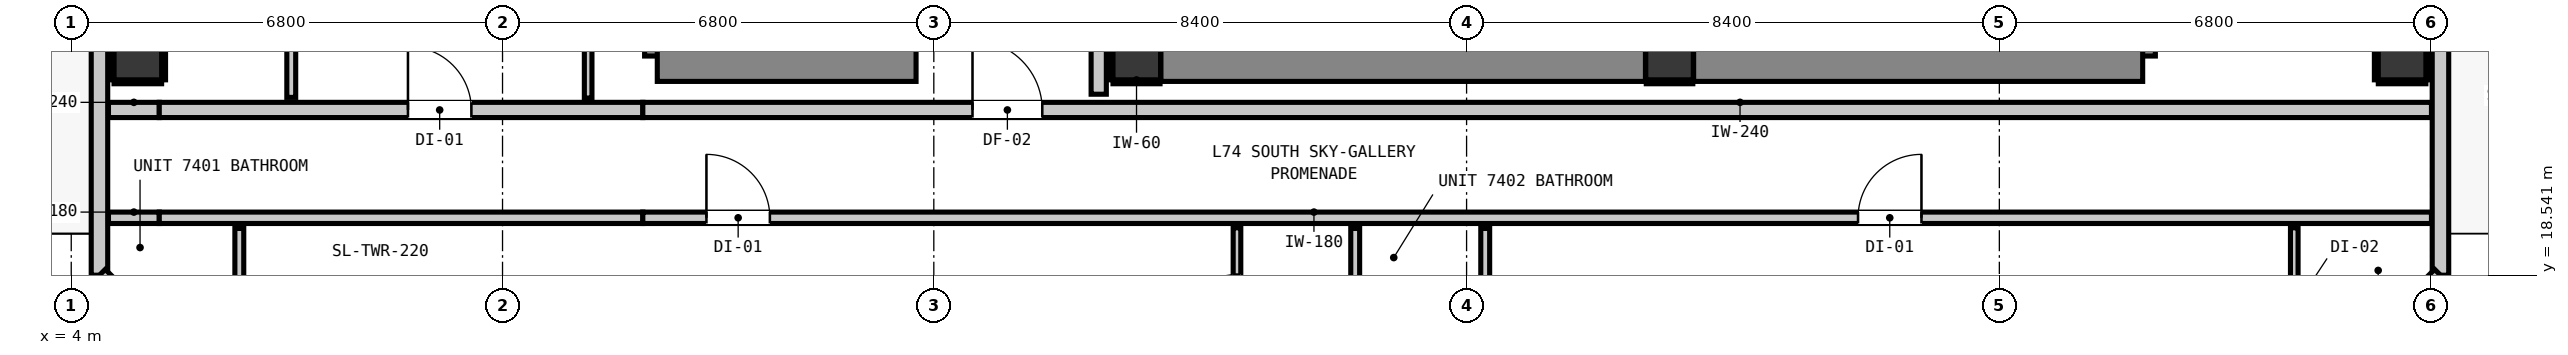
"""IFC4 building model, lengths in metres.
Left out: names, types, materials, properties, quantities, classifications, styles, units other than length and angle.
Written with IfcOpenShell. Run it as: python <this file> out.ifc"""

import sys

from ifc_helpers import new_model, si_unit, direction, frame, frame_2d, origin, origin_2d, place, context, subcontext, project, spatial, rectangle, extrude, element, fill, save


model = new_model("IFC4")
c1 = context("Model", 3, precision=1e-05, world=origin(), true_north=direction((0.0, 1.0)))
c2 = subcontext(c1, "Body", "Model", "MODEL_VIEW")
j1 = project(units=[si_unit("LENGTHUNIT", "METRE"), si_unit("PLANEANGLEUNIT", "RADIAN")], contexts=[c1])
p1 = place(None, origin())
s1 = spatial("IfcSite", under=j1, at=p1, CompositionType="ELEMENT")
p2 = place(p1, origin())
s2 = spatial("IfcBuilding", under=s1, at=p2, CompositionType="ELEMENT")
p3 = place(p2, frame((0.0, 0.0, 254.52)))
s3 = spatial("IfcBuildingStorey", under=s2, at=p3, CompositionType="ELEMENT", Elevation=254.52)
for number, where, z_axis, x_axis in (
    (1, (20.8, 22.0, 0.0), (0.0, 0.0, 1.0), (1.0, 0.0, 0.0)),
    (2, (29.2, 22.0, 0.0), (0.0, 0.0, 1.0), (1.0, 0.0, 0.0)),
):
    element("IfcColumn", number, at=place(p3, frame(where, z_axis=z_axis, x_axis=x_axis)), inside=s3, PredefinedType="COLUMN", context=c2, shape_type="SweptSolid", body=[
        extrude(rectangle(XDim=0.75, YDim=0.75, at=origin_2d()), origin(), (0.0, 0.0, 1.0), 3.32),
    ])
p4 = place(p3, frame((13.44, 22.0, 0.0), z_axis=(0.0, 0.0, 1.0), x_axis=(0.0, 1.0, 0.0)))
e3 = element("IfcWall", 3, at=p4, inside=s3, PredefinedType="SHEAR", context=c2, shape_type="SweptSolid", body=[
    extrude(rectangle(XDim=8.32, YDim=0.8, at=frame_2d((4.16, 0.0))), origin(), (0.0, 0.0, 1.0), 3.32),
])
p5 = place(p3, frame((13.24, 22.0, 0.0), z_axis=(0.0, 0.0, 1.0), x_axis=(1.0, 0.0, 0.0)))
e4 = element("IfcWall", 4, at=p5, inside=s3, PredefinedType="SHEAR", context=c2, shape_type="SweptSolid", body=[
    extrude(rectangle(XDim=4.08, YDim=0.8, at=frame_2d((2.04, 0.0))), origin(), (0.0, 0.0, 1.0), 3.32),
])
p6 = place(p3, frame((36.46, 22.0, 0.0), z_axis=(0.0, 0.0, 1.0), x_axis=(0.0, 1.0, 0.0)))
e5 = element("IfcWall", 5, at=p6, inside=s3, PredefinedType="SHEAR", context=c2, shape_type="SweptSolid", body=[
    extrude(rectangle(XDim=8.32, YDim=0.8, at=frame_2d((4.16, 0.0))), origin(), (0.0, 0.0, 1.0), 3.32),
])
p7 = place(p3, frame((29.58, 22.0, 0.0), z_axis=(0.0, 0.0, 1.0), x_axis=(1.0, 0.0, 0.0)))
e6 = element("IfcWall", 6, at=p7, inside=s3, PredefinedType="SHEAR", context=c2, shape_type="SweptSolid", body=[
    extrude(rectangle(XDim=7.08, YDim=0.8, at=frame_2d((3.54, 0.0))), origin(), (0.0, 0.0, 1.0), 3.32),
])
p8 = place(p3, frame((21.18, 22.0, 0.0), z_axis=(0.0, 0.0, 1.0), x_axis=(1.0, 0.0, 0.0)))
e7 = element("IfcWall", 7, at=p8, inside=s3, PredefinedType="SHEAR", context=c2, shape_type="SweptSolid", body=[
    extrude(rectangle(XDim=7.64, YDim=0.8, at=frame_2d((3.82, 0.0))), origin(), (0.0, 0.0, 1.0), 3.32),
])
for number, where, z_axis, x_axis in (
    (8, (5.05, 22.0, 0.0), (0.0, 0.0, 1.0), (1.0, 0.0, 0.0)),
    (9, (40.75, 22.0, 0.0), (0.0, 0.0, 1.0), (1.0, 0.0, 0.0)),
):
    element("IfcColumn", number, at=place(p3, frame(where, z_axis=z_axis, x_axis=x_axis)), inside=s3, PredefinedType="COLUMN", context=c2, shape_type="SweptSolid", body=[
        extrude(rectangle(XDim=0.75, YDim=0.75, at=origin_2d()), origin(), (0.0, 0.0, 1.0), 3.32),
    ])
p9 = place(p3, frame((4.445, 18.545, 0.0), z_axis=(0.0, 0.0, 1.0), x_axis=(0.0, 1.0, 0.0)))
e10 = element("IfcWall", 10, at=p9, inside=s3, PredefinedType="STANDARD", context=c2, shape_type="SweptSolid", body=[
    extrude(rectangle(XDim=30.31, YDim=0.26, at=frame_2d((15.155, 0.0))), origin(), (0.0, 0.0, 1.0), 2.96),
])
p10 = place(p9, frame((4.434, 0.0, 0.0)))
e11 = element("IfcOpeningElement", 11, at=p10, cuts=e10, PredefinedType="OPENING", context=c2, shape_type="SweptSolid", body=[
    extrude(rectangle(XDim=1.0, YDim=2.15, at=frame_2d((0.5, 1.075))), frame((0.0, 0.14, 0.0), z_axis=(0.0, -1.0, 0.0), x_axis=(1.0, 0.0, 0.0)), (0.0, 0.0, 1.0), 0.28),
])
p11 = place(p9, frame((27.715, 0.0, 0.85)))
e12 = element("IfcOpeningElement", 12, at=p11, cuts=e10, PredefinedType="OPENING", context=c2, shape_type="SweptSolid", body=[
    extrude(rectangle(XDim=2.1, YDim=1.9, at=frame_2d((1.05, 0.95))), frame((0.0, 0.14, 0.0), z_axis=(0.0, -1.0, 0.0), x_axis=(1.0, 0.0, 0.0)), (0.0, 0.0, 1.0), 0.28),
])
p12 = place(p3, frame((41.355, 48.855, 0.0), z_axis=(0.0, 0.0, 1.0), x_axis=(0.0, -1.0, 0.0)))
e13 = element("IfcWall", 13, at=p12, inside=s3, PredefinedType="STANDARD", context=c2, shape_type="SweptSolid", body=[
    extrude(rectangle(XDim=30.31, YDim=0.26, at=frame_2d((15.155, 0.0))), origin(), (0.0, 0.0, 1.0), 2.96),
])
p13 = place(p12, frame((0.91, 0.0, 0.0)))
e14 = element("IfcOpeningElement", 14, at=p13, cuts=e13, PredefinedType="OPENING", context=c2, shape_type="SweptSolid", body=[
    extrude(rectangle(XDim=1.0, YDim=2.15, at=frame_2d((0.5, 1.075))), frame((0.0, 0.14, 0.0), z_axis=(0.0, -1.0, 0.0), x_axis=(1.0, 0.0, 0.0)), (0.0, 0.0, 1.0), 0.28),
])
p14 = place(p12, frame((3.407, 0.0, 0.85)))
e15 = element("IfcOpeningElement", 15, at=p14, cuts=e13, PredefinedType="OPENING", context=c2, shape_type="SweptSolid", body=[
    extrude(rectangle(XDim=2.1, YDim=1.9, at=frame_2d((1.05, 0.95))), frame((0.0, 0.14, 0.0), z_axis=(0.0, -1.0, 0.0), x_axis=(1.0, 0.0, 0.0)), (0.0, 0.0, 1.0), 0.28),
])
for number, where, z_axis, x_axis in (
    (16, (41.355, 18.545, 0.0), (0.0, 0.0, 1.0), (-0.707, -0.707, 0.0)),
    (17, (6.545, 16.445, 0.0), (0.0, 0.0, 1.0), (-0.707, 0.707, 0.0)),
):
    element("IfcWall", number, at=place(p3, frame(where, z_axis=z_axis, x_axis=x_axis)), inside=s3, PredefinedType="STANDARD", context=c2, shape_type="SweptSolid", body=[
        extrude(rectangle(XDim=2.97, YDim=0.26, at=frame_2d((1.485, 0.0))), origin(), (0.0, 0.0, 1.0), 2.96),
    ])
p15 = place(p3, frame((4.587, 21.15, 0.0), z_axis=(0.0, 0.0, 1.0), x_axis=(1.0, 0.0, 0.0)))
e18 = element("IfcWall", 18, at=p15, inside=s3, PredefinedType="PARTITIONING", context=c2, shape_type="SweptSolid", body=[
    extrude(rectangle(XDim=0.801, YDim=0.24, at=frame_2d((0.4, 0.0))), origin(), (0.0, 0.0, 1.0), 2.96),
])
p16 = place(p3, frame((5.388, 21.15, 0.0), z_axis=(0.0, 0.0, 1.0), x_axis=(1.0, 0.0, 0.0)))
e19 = element("IfcWall", 19, at=p16, inside=s3, PredefinedType="PARTITIONING", context=c2, shape_type="SweptSolid", body=[
    extrude(rectangle(XDim=7.624, YDim=0.24, at=frame_2d((3.812, 0.0))), origin(), (0.0, 0.0, 1.0), 2.337),
])
p17 = place(p16, frame((3.921, 0.0, 0.0)))
e20 = element("IfcOpeningElement", 20, at=p17, cuts=e19, PredefinedType="OPENING", context=c2, shape_type="SweptSolid", body=[
    extrude(rectangle(XDim=1.0, YDim=2.15, at=frame_2d((0.5, 1.075))), frame((0.0, 0.13, 0.0), z_axis=(0.0, -1.0, 0.0), x_axis=(1.0, 0.0, 0.0)), (0.0, 0.0, 1.0), 0.26),
])
p18 = place(p3, frame((13.012, 21.15, 0.0), z_axis=(0.0, 0.0, 1.0), x_axis=(1.0, 0.0, 0.0)))
e21 = element("IfcWall", 21, at=p18, inside=s3, PredefinedType="PARTITIONING", context=c2, shape_type="SweptSolid", body=[
    extrude(rectangle(XDim=28.201, YDim=0.24, at=frame_2d((14.101, 0.0))), origin(), (0.0, 0.0, 1.0), 2.96),
])
p19 = place(p18, frame((5.198, 0.0, 0.0)))
e22 = element("IfcOpeningElement", 22, at=p19, cuts=e21, PredefinedType="OPENING", context=c2, shape_type="SweptSolid", body=[
    extrude(rectangle(XDim=1.1, YDim=2.15, at=frame_2d((0.55, 1.075))), frame((0.0, 0.13, 0.0), z_axis=(0.0, -1.0, 0.0), x_axis=(1.0, 0.0, 0.0)), (0.0, 0.0, 1.0), 0.26),
])
p20 = place(p3, frame((4.587, 19.45, 0.0), z_axis=(0.0, 0.0, 1.0), x_axis=(1.0, 0.0, 0.0)))
e23 = element("IfcWall", 23, at=p20, inside=s3, PredefinedType="PARTITIONING", context=c2, shape_type="SweptSolid", body=[
    extrude(rectangle(XDim=0.801, YDim=0.18, at=frame_2d((0.4, 0.0))), origin(), (0.0, 0.0, 1.0), 2.96),
])
p21 = place(p3, frame((5.388, 19.45, 0.0), z_axis=(0.0, 0.0, 1.0), x_axis=(1.0, 0.0, 0.0)))
e24 = element("IfcWall", 24, at=p21, inside=s3, PredefinedType="PARTITIONING", context=c2, shape_type="SweptSolid", body=[
    extrude(rectangle(XDim=7.624, YDim=0.18, at=frame_2d((3.812, 0.0))), origin(), (0.0, 0.0, 1.0), 2.337),
])
p22 = place(p3, frame((13.012, 19.45, 0.0), z_axis=(0.0, 0.0, 1.0), x_axis=(1.0, 0.0, 0.0)))
e25 = element("IfcWall", 25, at=p22, inside=s3, PredefinedType="PARTITIONING", context=c2, shape_type="SweptSolid", body=[
    extrude(rectangle(XDim=28.201, YDim=0.18, at=frame_2d((14.101, 0.0))), origin(), (0.0, 0.0, 1.0), 2.96),
])
p23 = place(p22, frame((1.003, 0.0, 0.0)))
e26 = element("IfcOpeningElement", 26, at=p23, cuts=e25, PredefinedType="OPENING", context=c2, shape_type="SweptSolid", body=[
    extrude(rectangle(XDim=1.0, YDim=2.15, at=frame_2d((0.5, 1.075))), frame((0.0, 0.1, 0.0), z_axis=(0.0, -1.0, 0.0), x_axis=(1.0, 0.0, 0.0)), (0.0, 0.0, 1.0), 0.2),
])
p24 = place(p22, frame((19.16, 0.0, 0.0)))
e27 = element("IfcOpeningElement", 27, at=p24, cuts=e25, PredefinedType="OPENING", context=c2, shape_type="SweptSolid", body=[
    extrude(rectangle(XDim=1.0, YDim=2.15, at=frame_2d((0.5, 1.075))), frame((0.0, 0.1, 0.0), z_axis=(0.0, -1.0, 0.0), x_axis=(1.0, 0.0, 0.0)), (0.0, 0.0, 1.0), 0.2),
])
p25 = place(p3, frame((20.2, 21.398, 0.0), z_axis=(0.0, 0.0, 1.0), x_axis=(0.0, 1.0, 0.0)))
e28 = element("IfcWall", 28, at=p25, inside=s3, PredefinedType="PARTITIONING", context=c2, shape_type="SweptSolid", body=[
    extrude(rectangle(XDim=6.754, YDim=0.24, at=frame_2d((3.377, 0.0))), origin(), (0.0, 0.0, 1.0), 2.96),
])
p26 = place(p3, frame((6.65, 16.587, 0.0), z_axis=(0.0, 0.0, 1.0), x_axis=(0.0, 1.0, 0.0)))
e29 = element("IfcWall", 29, at=p26, inside=s3, PredefinedType="PARTITIONING", context=c2, shape_type="SweptSolid", body=[
    extrude(rectangle(XDim=2.695, YDim=0.14, at=frame_2d((1.348, 0.0))), origin(), (0.0, 0.0, 1.0), 2.96),
])
p27 = place(p26, frame((1.008, 0.0, 0.0)))
e30 = element("IfcOpeningElement", 30, at=p27, cuts=e29, PredefinedType="OPENING", context=c2, shape_type="SweptSolid", body=[
    extrude(rectangle(XDim=0.86, YDim=2.02, at=frame_2d((0.43, 1.01))), frame((0.0, 0.08, 0.0), z_axis=(0.0, -1.0, 0.0), x_axis=(1.0, 0.0, 0.0)), (0.0, 0.0, 1.0), 0.16),
])
p28 = place(p3, frame((7.469, 21.348, 0.0), z_axis=(0.0, 0.0, 1.0), x_axis=(0.0, 1.0, 0.0)))
e31 = element("IfcWall", 31, at=p28, inside=s3, PredefinedType="PARTITIONING", context=c2, shape_type="SweptSolid", body=[
    extrude(rectangle(XDim=4.804, YDim=0.14, at=frame_2d((2.402, 0.0))), origin(), (0.0, 0.0, 1.0), 2.96),
])
p29 = place(p28, frame((1.94, 0.0, 0.0)))
e32 = element("IfcOpeningElement", 32, at=p29, cuts=e31, PredefinedType="OPENING", context=c2, shape_type="SweptSolid", body=[
    extrude(rectangle(XDim=0.9, YDim=2.1, at=frame_2d((0.45, 1.05))), frame((0.0, 0.08, 0.0), z_axis=(0.0, -1.0, 0.0), x_axis=(1.0, 0.0, 0.0)), (0.0, 0.0, 1.0), 0.16),
])
p30 = place(p3, frame((24.244, 16.587, 0.0), z_axis=(0.0, 0.0, 1.0), x_axis=(0.0, 1.0, 0.0)))
e33 = element("IfcWall", 33, at=p30, inside=s3, PredefinedType="PARTITIONING", context=c2, shape_type="SweptSolid", body=[
    extrude(rectangle(XDim=2.695, YDim=0.14, at=frame_2d((1.348, 0.0))), origin(), (0.0, 0.0, 1.0), 2.96),
])
p31 = place(p3, frame((26.294, 16.587, 0.0), z_axis=(0.0, 0.0, 1.0), x_axis=(0.0, 1.0, 0.0)))
e34 = element("IfcWall", 34, at=p31, inside=s3, PredefinedType="PARTITIONING", context=c2, shape_type="SweptSolid", body=[
    extrude(rectangle(XDim=2.695, YDim=0.14, at=frame_2d((1.348, 0.0))), origin(), (0.0, 0.0, 1.0), 2.96),
])
p32 = place(p31, frame((1.008, 0.0, 0.0)))
e35 = element("IfcOpeningElement", 35, at=p32, cuts=e34, PredefinedType="OPENING", context=c2, shape_type="SweptSolid", body=[
    extrude(rectangle(XDim=0.86, YDim=2.02, at=frame_2d((0.43, 1.01))), frame((0.0, 0.08, 0.0), z_axis=(0.0, -1.0, 0.0), x_axis=(1.0, 0.0, 0.0)), (0.0, 0.0, 1.0), 0.16),
])
p33 = place(p3, frame((12.15, 21.338, 0.0), z_axis=(0.0, 0.0, 1.0), x_axis=(0.0, 1.0, 0.0)))
e36 = element("IfcWall", 36, at=p33, inside=s3, PredefinedType="PARTITIONING", context=c2, shape_type="SweptSolid", body=[
    extrude(rectangle(XDim=10.154, YDim=0.12, at=frame_2d((5.077, 0.0))), origin(), (0.0, 0.0, 1.0), 2.96),
])
p34 = place(p3, frame((22.38, 16.587, 0.0), z_axis=(0.0, 0.0, 1.0), x_axis=(0.0, 1.0, 0.0)))
e37 = element("IfcWall", 37, at=p34, inside=s3, PredefinedType="PARTITIONING", context=c2, shape_type="SweptSolid", body=[
    extrude(rectangle(XDim=2.705, YDim=0.12, at=frame_2d((1.353, 0.0))), origin(), (0.0, 0.0, 1.0), 2.96),
])
p35 = place(p34, frame((1.068, 0.0, 0.0)))
e38 = element("IfcOpeningElement", 38, at=p35, cuts=e37, PredefinedType="OPENING", context=c2, shape_type="SweptSolid", body=[
    extrude(rectangle(XDim=0.9, YDim=2.1, at=frame_2d((0.45, 1.05))), frame((0.0, 0.07, 0.0), z_axis=(0.0, -1.0, 0.0), x_axis=(1.0, 0.0, 0.0)), (0.0, 0.0, 1.0), 0.14),
])
p36 = place(p3, frame((39.05, 16.587, 0.0), z_axis=(0.0, 0.0, 1.0), x_axis=(0.0, 1.0, 0.0)))
e39 = element("IfcWall", 39, at=p36, inside=s3, PredefinedType="PARTITIONING", context=c2, shape_type="SweptSolid", body=[
    extrude(rectangle(XDim=2.705, YDim=0.12, at=frame_2d((1.353, 0.0))), origin(), (0.0, 0.0, 1.0), 2.96),
])
p37 = place(p36, frame((0.988, 0.0, 0.0)))
e40 = element("IfcOpeningElement", 40, at=p37, cuts=e39, PredefinedType="OPENING", context=c2, shape_type="SweptSolid", body=[
    extrude(rectangle(XDim=0.9, YDim=2.1, at=frame_2d((0.45, 1.05))), frame((0.0, 0.07, 0.0), z_axis=(0.0, -1.0, 0.0), x_axis=(1.0, 0.0, 0.0)), (0.0, 0.0, 1.0), 0.14),
])
p38 = place(p3, frame((20.425, 21.593, 0.0), z_axis=(0.0, 0.0, 1.0), x_axis=(1.0, 0.0, 0.0)))
e41 = element("IfcWall", 41, at=p38, inside=s3, PredefinedType="PARTITIONING", context=c2, shape_type="SweptSolid", body=[
    extrude(rectangle(XDim=0.742, YDim=0.06, at=frame_2d((0.371, 0.0))), origin(), (0.0, 0.0, 1.0), 1.45),
])
p39 = place(p3, frame((20.393, 21.625, 0.0), z_axis=(0.0, 0.0, 1.0), x_axis=(0.0, 1.0, 0.0)))
e42 = element("IfcWall", 42, at=p39, inside=s3, PredefinedType="PARTITIONING", context=c2, shape_type="SweptSolid", body=[
    extrude(rectangle(XDim=0.75, YDim=0.06, at=frame_2d((0.375, 0.0))), origin(), (0.0, 0.0, 1.0), 1.45),
])
p40 = place(p3, frame((28.833, 21.593, 0.0), z_axis=(0.0, 0.0, 1.0), x_axis=(1.0, 0.0, 0.0)))
e43 = element("IfcWall", 43, at=p40, inside=s3, PredefinedType="PARTITIONING", context=c2, shape_type="SweptSolid", body=[
    extrude(rectangle(XDim=0.734, YDim=0.06, at=frame_2d((0.367, 0.0))), origin(), (0.0, 0.0, 1.0), 1.45),
])
for number, where, z_axis, x_axis in (
    (44, (4.675, 21.593, 0.0), (0.0, 0.0, 1.0), (1.0, 0.0, 0.0)),
    (45, (4.643, 21.625, 0.0), (0.0, 0.0, 1.0), (0.0, 1.0, 0.0)),
    (46, (5.457, 21.625, 0.0), (0.0, 0.0, 1.0), (0.0, 1.0, 0.0)),
    (47, (40.375, 21.593, 0.0), (0.0, 0.0, 1.0), (1.0, 0.0, 0.0)),
    (48, (40.343, 21.625, 0.0), (0.0, 0.0, 1.0), (0.0, 1.0, 0.0)),
    (49, (41.157, 21.625, 0.0), (0.0, 0.0, 1.0), (0.0, 1.0, 0.0)),
):
    element("IfcWall", number, at=place(p3, frame(where, z_axis=z_axis, x_axis=x_axis)), inside=s3, PredefinedType="PARTITIONING", context=c2, shape_type="SweptSolid", body=[
        extrude(rectangle(XDim=0.75, YDim=0.06, at=frame_2d((0.375, 0.0))), origin(), (0.0, 0.0, 1.0), 1.45),
    ])
p41 = place(p19, origin())
e50 = element("IfcDoor", 50, at=p41, inside=s3, OperationType="SINGLE_SWING_LEFT", PredefinedType="DOOR", context=c2, shape_type="SweptSolid", body=[
    extrude(rectangle(XDim=1.1, YDim=2.15, at=frame_2d((0.55, 1.075))), frame((0.0, 0.025, 0.0), z_axis=(0.0, -1.0, 0.0), x_axis=(1.0, 0.0, 0.0)), (0.0, 0.0, 1.0), 0.05),
])
fill(e22, e50)
p42 = place(p23, origin())
e51 = element("IfcDoor", 51, at=p42, inside=s3, OperationType="SINGLE_SWING_LEFT", PredefinedType="DOOR", context=c2, shape_type="SweptSolid", body=[
    extrude(rectangle(XDim=1.0, YDim=2.15, at=frame_2d((0.5, 1.075))), frame((0.0, 0.025, 0.0), z_axis=(0.0, -1.0, 0.0), x_axis=(1.0, 0.0, 0.0)), (0.0, 0.0, 1.0), 0.05),
])
fill(e26, e51)
p43 = place(p35, origin())
e52 = element("IfcDoor", 52, at=p43, inside=s3, OperationType="SINGLE_SWING_LEFT", PredefinedType="DOOR", context=c2, shape_type="SweptSolid", body=[
    extrude(rectangle(XDim=0.9, YDim=2.1, at=frame_2d((0.45, 1.05))), frame((0.0, 0.025, 0.0), z_axis=(0.0, -1.0, 0.0), x_axis=(1.0, 0.0, 0.0)), (0.0, 0.0, 1.0), 0.05),
])
fill(e38, e52)
p44 = place(p24, origin())
e53 = element("IfcDoor", 53, at=p44, inside=s3, OperationType="SINGLE_SWING_RIGHT", PredefinedType="DOOR", context=c2, shape_type="SweptSolid", body=[
    extrude(rectangle(XDim=1.0, YDim=2.15, at=frame_2d((0.5, 1.075))), frame((0.0, 0.025, 0.0), z_axis=(0.0, -1.0, 0.0), x_axis=(1.0, 0.0, 0.0)), (0.0, 0.0, 1.0), 0.05),
])
fill(e27, e53)
p45 = place(p17, origin())
e54 = element("IfcDoor", 54, at=p45, inside=s3, OperationType="SINGLE_SWING_LEFT", PredefinedType="DOOR", context=c2, shape_type="SweptSolid", body=[
    extrude(rectangle(XDim=1.0, YDim=2.15, at=frame_2d((0.5, 1.075))), frame((0.0, 0.025, 0.0), z_axis=(0.0, -1.0, 0.0), x_axis=(1.0, 0.0, 0.0)), (0.0, 0.0, 1.0), 0.05),
])
fill(e20, e54)
save(model, sys.argv[1])
